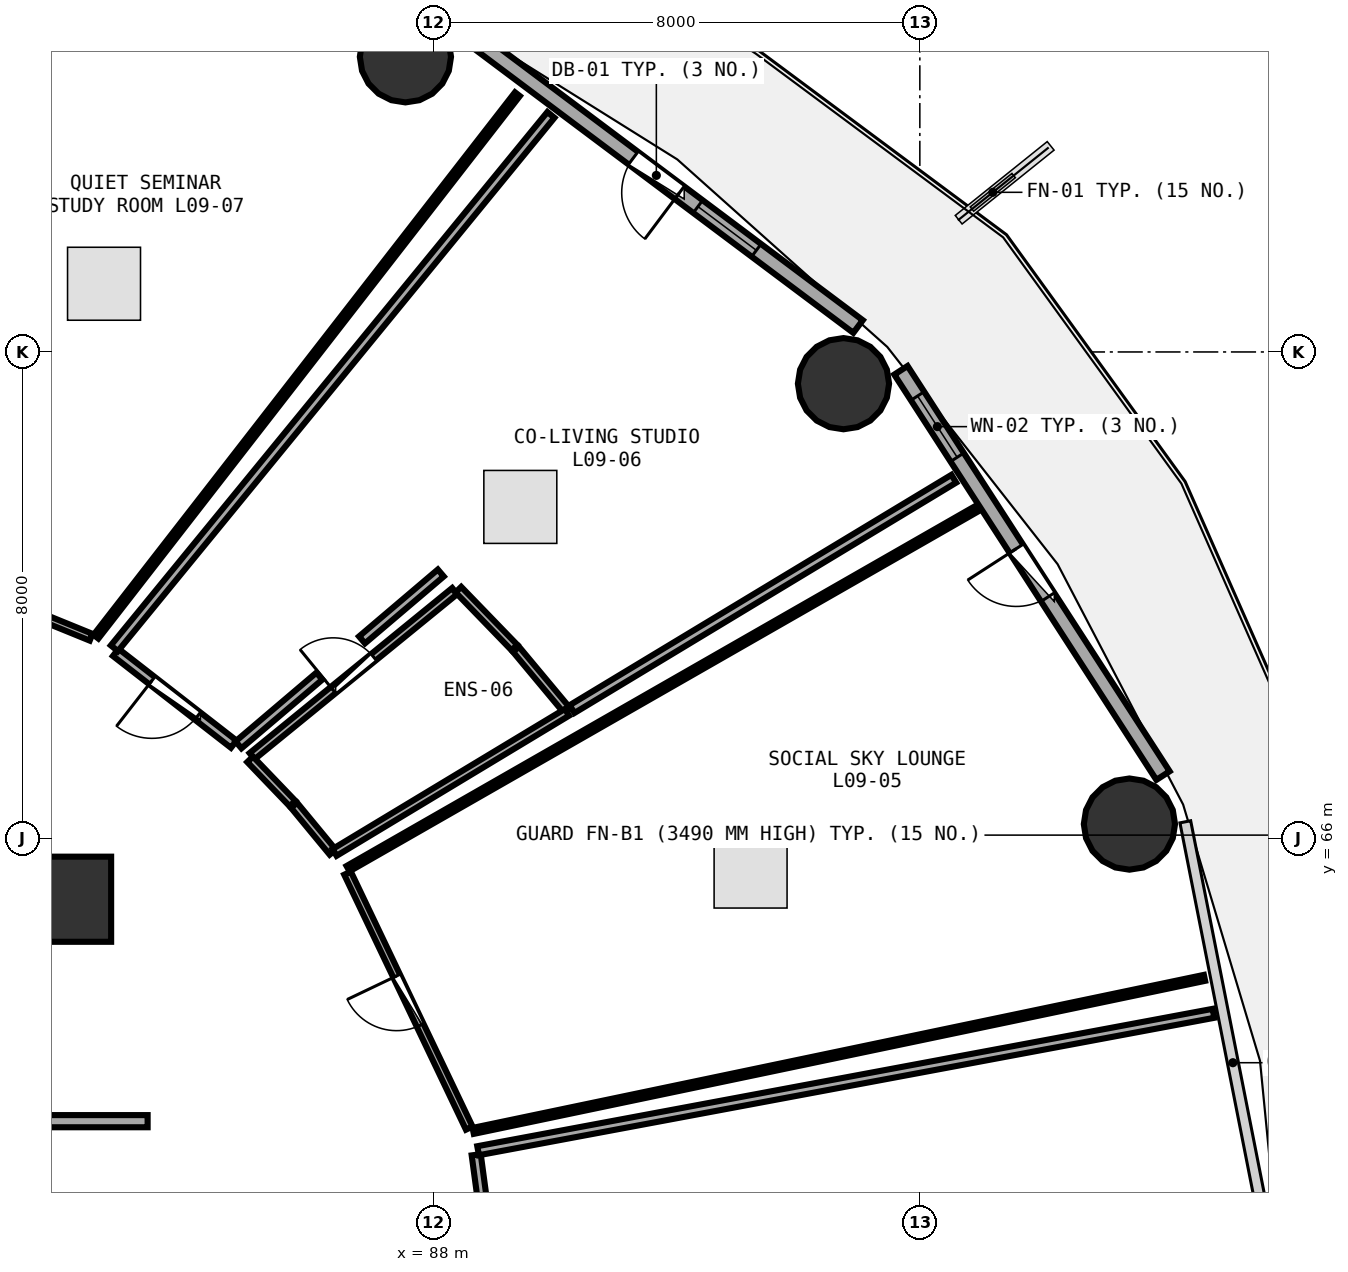
"""IFC4 building model, lengths in metres.
Left out: names, types, materials, properties, quantities, classifications, styles, units other than length and angle.
Written with IfcOpenShell. Run it as: python <this file> out.ifc"""

import sys

from ifc_helpers import new_model, si_unit, direction, frame, frame_2d, origin, origin_2d, place, context, subcontext, project, spatial, rectangle, circle, extrude, element, fill, save


model = new_model("IFC4")
c1 = context("Model", 3, precision=1e-05, world=origin(), true_north=direction((0.0, 1.0)))
c2 = subcontext(c1, "Body", "Model", "MODEL_VIEW")
j1 = project(units=[si_unit("LENGTHUNIT", "METRE"), si_unit("PLANEANGLEUNIT", "RADIAN")], contexts=[c1])
p1 = place(None, origin())
s1 = spatial("IfcSite", under=j1, at=p1, CompositionType="ELEMENT")
p2 = place(p1, origin())
s2 = spatial("IfcBuilding", under=s1, at=p2, CompositionType="ELEMENT")
p3 = place(p2, frame((0.0, 0.0, 37.5)))
s3 = spatial("IfcBuildingStorey", under=s2, at=p3, CompositionType="ELEMENT", Elevation=37.5)
p4 = place(p3, frame((82.0, 65.0, 0.0), z_axis=(0.0, 0.0, 1.0), x_axis=(1.0, 0.0, 0.0)))
e1 = element("IfcColumn", 1, at=p4, inside=s3, PredefinedType="PILASTER", context=c2, shape_type="SweptSolid", body=[
    extrude(rectangle(XDim=1.4, YDim=1.4, at=origin_2d()), origin(), (0.0, 0.0, 1.0), 3.75),
])
for number, where, z_axis, x_axis in (
    (2, (99.447, 66.236, 0.0), (0.0, 0.0, 1.0), (1.0, 0.0, 0.0)),
    (3, (94.744, 73.478, 0.0), (0.0, 0.0, 1.0), (1.0, 0.0, 0.0)),
    (4, (87.54, 78.854, 0.0), (0.0, 0.0, 1.0), (1.0, 0.0, 0.0)),
):
    element("IfcColumn", number, at=place(p3, frame(where, z_axis=z_axis, x_axis=x_axis)), inside=s3, PredefinedType="COLUMN", context=c2, shape_type="SweptSolid", body=[
        extrude(circle(Radius=0.75, at=origin_2d()), origin(), (0.0, 0.0, 1.0), 3.75),
    ])
p5 = place(p3, frame((99.999, 67.033, 0.0), z_axis=(0.0, 0.0, 1.0), x_axis=(-0.543005114258, 0.839729388488, 0.0)))
e5 = element("IfcWall", 5, at=p5, inside=s3, PredefinedType="SOLIDWALL", context=c2, shape_type="SweptSolid", body=[
    extrude(rectangle(XDim=7.938, YDim=0.26, at=frame_2d((3.969, 0.0))), origin(), (0.0, 0.0, 1.0), 3.475),
])
p6 = place(p5, frame((3.494, 0.0, 0.0)))
e6 = element("IfcOpeningElement", 6, at=p6, cuts=e5, PredefinedType="OPENING", context=c2, shape_type="SweptSolid", body=[
    extrude(rectangle(XDim=0.95, YDim=2.1, at=frame_2d((0.475, 1.05))), frame((0.0, 0.14, 0.0), z_axis=(0.0, -1.0, 0.0), x_axis=(1.0, 0.0, 0.0)), (0.0, 0.0, 1.0), 0.28),
])
p7 = place(p5, frame((6.234, 0.0, 0.85)))
e7 = element("IfcOpeningElement", 7, at=p7, cuts=e5, PredefinedType="OPENING", context=c2, shape_type="SweptSolid", body=[
    extrude(rectangle(XDim=1.2, YDim=1.45, at=frame_2d((0.6, 0.725))), frame((0.0, 0.14, 0.0), z_axis=(0.0, -1.0, 0.0), x_axis=(1.0, 0.0, 0.0)), (0.0, 0.0, 1.0), 0.28),
])
p8 = place(p3, frame((94.984, 74.418, 0.0), z_axis=(0.0, 0.0, 1.0), x_axis=(-0.80030733173, 0.599590005569, 0.0)))
e8 = element("IfcWall", 8, at=p8, inside=s3, PredefinedType="SOLIDWALL", context=c2, shape_type="SweptSolid", body=[
    extrude(rectangle(XDim=8.291, YDim=0.26, at=frame_2d((4.145, 0.0))), origin(), (0.0, 0.0, 1.0), 3.475),
])
p9 = place(p8, frame((3.67, 0.0, 0.0)))
e9 = element("IfcOpeningElement", 9, at=p9, cuts=e8, PredefinedType="OPENING", context=c2, shape_type="SweptSolid", body=[
    extrude(rectangle(XDim=0.95, YDim=2.1, at=frame_2d((0.475, 1.05))), frame((0.0, 0.14, 0.0), z_axis=(0.0, -1.0, 0.0), x_axis=(1.0, 0.0, 0.0)), (0.0, 0.0, 1.0), 0.28),
])
p10 = place(p8, frame((2.09, 0.0, 0.85)))
e10 = element("IfcOpeningElement", 10, at=p10, cuts=e8, PredefinedType="OPENING", context=c2, shape_type="SweptSolid", body=[
    extrude(rectangle(XDim=1.2, YDim=1.45, at=frame_2d((0.6, 0.725))), frame((0.0, 0.14, 0.0), z_axis=(0.0, -1.0, 0.0), x_axis=(1.0, 0.0, 0.0)), (0.0, 0.0, 1.0), 0.28),
])
p11 = place(p3, frame((74.0, 64.6, 0.0), z_axis=(0.0, 0.0, 1.0), x_axis=(1.0, 0.0, 0.0)))
e11 = element("IfcWall", 11, at=p11, inside=s3, PredefinedType="SHEAR", context=c2, shape_type="SweptSolid", body=[
    extrude(rectangle(XDim=8.0, YDim=0.45, at=frame_2d((4.0, 0.0))), origin(), (0.0, 0.0, 1.0), 3.49),
])
p12 = place(p3, frame((79.3, 61.35, 0.0), z_axis=(0.0, 0.0, 1.0), x_axis=(1.0, 0.0, 0.0)))
e12 = element("IfcWall", 12, at=p12, inside=s3, PredefinedType="SOLIDWALL", context=c2, shape_type="SweptSolid", body=[
    extrude(rectangle(XDim=4.0, YDim=0.2, at=frame_2d((2.0, 0.0))), origin(), (0.0, 0.0, 1.0), 2.775),
])
p13 = place(p12, frame((0.45, 0.0, 0.0)))
e13 = element("IfcOpeningElement", 13, at=p13, cuts=e12, PredefinedType="OPENING", context=c2, shape_type="SweptSolid", body=[
    extrude(rectangle(XDim=1.2, YDim=2.15, at=frame_2d((0.6, 1.075))), frame((0.0, 0.11, 0.0), z_axis=(0.0, -1.0, 0.0), x_axis=(1.0, 0.0, 0.0)), (0.0, 0.0, 1.0), 0.22),
])
p14 = place(p3, frame((89.014, 58.502, 0.0), z_axis=(0.0, 0.0, 1.0), x_axis=(-0.133772399852, 0.991012081176, 0.0)))
e14 = element("IfcWall", 14, at=p14, inside=s3, PredefinedType="PARTITIONING", context=c2, shape_type="SweptSolid", body=[
    extrude(rectangle(XDim=2.316, YDim=0.15, at=frame_2d((1.158, 0.0))), origin(), (0.0, 0.0, 1.0), 3.48),
])
p15 = place(p14, frame((0.683, 0.0, 0.0)))
e15 = element("IfcOpeningElement", 15, at=p15, cuts=e14, PredefinedType="OPENING", context=c2, shape_type="SweptSolid", body=[
    extrude(rectangle(XDim=0.95, YDim=2.08, at=frame_2d((0.475, 1.04))), frame((0.0, 0.085, 0.0), z_axis=(0.0, -1.0, 0.0), x_axis=(1.0, 0.0, 0.0)), (0.0, 0.0, 1.0), 0.17),
])
p16 = place(p3, frame((88.589, 61.236, 0.0), z_axis=(0.0, 0.0, 1.0), x_axis=(-0.430743204219, 0.902474538155, 0.0)))
e16 = element("IfcWall", 16, at=p16, inside=s3, PredefinedType="PARTITIONING", context=c2, shape_type="SweptSolid", body=[
    extrude(rectangle(XDim=4.646, YDim=0.12, at=frame_2d((2.323, 0.0))), origin(), (0.0, 0.0, 1.0), 2.875),
])
p17 = place(p16, frame((1.873, 0.0, 0.0)))
e17 = element("IfcOpeningElement", 17, at=p17, cuts=e16, PredefinedType="OPENING", context=c2, shape_type="SweptSolid", body=[
    extrude(rectangle(XDim=0.9, YDim=2.08, at=frame_2d((0.45, 1.04))), frame((0.0, 0.07, 0.0), z_axis=(0.0, -1.0, 0.0), x_axis=(1.0, 0.0, 0.0)), (0.0, 0.0, 1.0), 0.14),
])
p18 = place(p3, frame((85.019, 67.353, 0.0), z_axis=(0.0, 0.0, 1.0), x_axis=(0.775195837983, 0.631720992823, 0.0)))
e18 = element("IfcWall", 18, at=p18, inside=s3, PredefinedType="PLUMBINGWALL", context=c2, shape_type="SweptSolid", body=[
    extrude(rectangle(XDim=4.298, YDim=0.13, at=frame_2d((2.149, 0.0))), origin(), (0.0, 0.0, 1.0), 3.235),
])
p19 = place(p18, frame((1.719, 0.0, 0.0)))
e19 = element("IfcOpeningElement", 19, at=p19, cuts=e18, PredefinedType="OPENING", context=c2, shape_type="SweptSolid", body=[
    extrude(rectangle(XDim=0.86, YDim=2.05, at=frame_2d((0.43, 1.025))), frame((0.0, 0.075, 0.0), z_axis=(0.0, -1.0, 0.0), x_axis=(1.0, 0.0, 0.0)), (0.0, 0.0, 1.0), 0.15),
])
p20 = place(p3, frame((84.717, 67.55, 0.0), z_axis=(0.0, 0.0, 1.0), x_axis=(-0.78945378775, 0.613810000739, 0.0)))
e20 = element("IfcWall", 20, at=p20, inside=s3, PredefinedType="PARTITIONING", context=c2, shape_type="SweptSolid", body=[
    extrude(rectangle(XDim=2.459, YDim=0.15, at=frame_2d((1.229, 0.0))), origin(), (0.0, 0.0, 1.0), 2.875),
])
p21 = place(p20, frame((0.754, 0.0, 0.0)))
e21 = element("IfcOpeningElement", 21, at=p21, cuts=e20, PredefinedType="OPENING", context=c2, shape_type="SweptSolid", body=[
    extrude(rectangle(XDim=0.95, YDim=2.08, at=frame_2d((0.475, 1.04))), frame((0.0, 0.085, 0.0), z_axis=(0.0, -1.0, 0.0), x_axis=(1.0, 0.0, 0.0)), (0.0, 0.0, 1.0), 0.17),
])
p22 = place(p3, frame((82.37, 69.309, 0.0), z_axis=(0.0, 0.0, 1.0), x_axis=(-0.925986810505, 0.377555859139, 0.0)))
e22 = element("IfcWall", 22, at=p22, inside=s3, PredefinedType="PARTITIONING", context=c2, shape_type="SweptSolid", body=[
    extrude(rectangle(XDim=4.971, YDim=0.12, at=frame_2d((2.485, 0.0))), origin(), (0.0, 0.0, 1.0), 2.875),
])
p23 = place(p22, frame((2.035, 0.0, 0.0)))
e23 = element("IfcOpeningElement", 23, at=p23, cuts=e22, PredefinedType="OPENING", context=c2, shape_type="SweptSolid", body=[
    extrude(rectangle(XDim=0.9, YDim=2.08, at=frame_2d((0.45, 1.04))), frame((0.0, 0.07, 0.0), z_axis=(0.0, -1.0, 0.0), x_axis=(1.0, 0.0, 0.0)), (0.0, 0.0, 1.0), 0.14),
])
p24 = place(p3, frame((88.735, 60.864, 0.0), z_axis=(0.0, 0.0, 1.0), x_axis=(0.982991936411, 0.183648721617, 0.0)))
e24 = element("IfcWall", 24, at=p24, inside=s3, PredefinedType="PARTITIONING", context=c2, shape_type="SweptSolid", body=[
    extrude(rectangle(XDim=12.303, YDim=0.15, at=frame_2d((6.152, 0.0))), origin(), (0.0, 0.0, 1.0), 2.875),
])
p25 = place(p3, frame((86.597, 65.503, 0.0), z_axis=(0.0, 0.0, 1.0), x_axis=(0.867860677455, 0.496807653451, 0.0)))
e25 = element("IfcWall", 25, at=p25, inside=s3, PredefinedType="PARTITIONING", context=c2, shape_type="SweptSolid", body=[
    extrude(rectangle(XDim=11.91, YDim=0.1, at=frame_2d((5.955, 0.0))), origin(), (0.0, 0.0, 1.0), 2.875),
])
p26 = place(p3, frame((100.682, 63.707, 0.0), z_axis=(0.0, 0.0, 1.0), x_axis=(-0.978803686819, -0.204800738937, 0.0)))
e26 = element("IfcWall", 26, at=p26, inside=s3, PredefinedType="PARTITIONING", context=c2, shape_type="SweptSolid", body=[
    extrude(rectangle(XDim=12.288, YDim=0.1, at=frame_2d((6.144, 0.0))), origin(), (0.0, 0.0, 1.0), 2.875),
])
p27 = place(p3, frame((86.344, 65.774, 0.0), z_axis=(0.0, 0.0, 1.0), x_axis=(-0.636401138893, 0.771358276299, 0.0)))
e27 = element("IfcWall", 27, at=p27, inside=s3, PredefinedType="PLUMBINGWALL", context=c2, shape_type="SweptSolid", body=[
    extrude(rectangle(XDim=0.999, YDim=0.13, at=frame_2d((0.499, 0.0))), origin(), (0.0, 0.0, 1.0), 3.48),
])
p28 = place(p3, frame((85.682, 66.574, 0.0), z_axis=(0.0, 0.0, 1.0), x_axis=(-0.692147793157, 0.721755798334, 0.0)))
e28 = element("IfcWall", 28, at=p28, inside=s3, PredefinedType="PLUMBINGWALL", context=c2, shape_type="SweptSolid", body=[
    extrude(rectangle(XDim=1.006, YDim=0.13, at=frame_2d((0.503, 0.0))), origin(), (0.0, 0.0, 1.0), 2.875),
])
p29 = place(p3, frame((88.411, 70.092, 0.0), z_axis=(0.0, 0.0, 1.0), x_axis=(0.695307837391, -0.718712050311, 0.0)))
e29 = element("IfcWall", 29, at=p29, inside=s3, PredefinedType="PLUMBINGWALL", context=c2, shape_type="SweptSolid", body=[
    extrude(rectangle(XDim=1.325, YDim=0.13, at=frame_2d((0.662, 0.0))), origin(), (0.0, 0.0, 1.0), 2.875),
])
p30 = place(p3, frame((89.359, 69.11, 0.0), z_axis=(0.0, 0.0, 1.0), x_axis=(0.640366952349, -0.7680691156, 0.0)))
e30 = element("IfcWall", 30, at=p30, inside=s3, PredefinedType="PLUMBINGWALL", context=c2, shape_type="SweptSolid", body=[
    extrude(rectangle(XDim=1.315, YDim=0.13, at=frame_2d((0.658, 0.0))), origin(), (0.0, 0.0, 1.0), 3.48),
])
p31 = place(p3, frame((90.197, 68.074, 0.0), z_axis=(0.0, 0.0, 1.0), x_axis=(-0.856439095373, -0.516248075945, 0.0)))
e31 = element("IfcWall", 31, at=p31, inside=s3, PredefinedType="PLUMBINGWALL", context=c2, shape_type="SweptSolid", body=[
    extrude(rectangle(XDim=4.464, YDim=0.13, at=frame_2d((2.232, 0.0))), origin(), (0.0, 0.0, 1.0), 3.235),
])
p32 = place(p3, frame((82.753, 69.127, 0.0), z_axis=(0.0, 0.0, 1.0), x_axis=(0.633350378952, 0.773865167508, 0.0)))
e32 = element("IfcWall", 32, at=p32, inside=s3, PredefinedType="PARTITIONING", context=c2, shape_type="SweptSolid", body=[
    extrude(rectangle(XDim=11.335, YDim=0.15, at=frame_2d((5.667, 0.0))), origin(), (0.0, 0.0, 1.0), 2.875),
])
p33 = place(p3, frame((96.559, 71.915, 0.0), z_axis=(0.0, 0.0, 1.0), x_axis=(-0.856200610964, -0.516643507444, 0.0)))
e33 = element("IfcWall", 33, at=p33, inside=s3, PredefinedType="PARTITIONING", context=c2, shape_type="SweptSolid", body=[
    extrude(rectangle(XDim=7.333, YDim=0.15, at=frame_2d((3.667, 0.0))), origin(), (0.0, 0.0, 1.0), 2.875),
])
p34 = place(p3, frame((88.122, 70.365, 0.0), z_axis=(0.0, 0.0, 1.0), x_axis=(-0.762159009155, -0.647389870761, 0.0)))
e34 = element("IfcWall", 34, at=p34, inside=s3, PredefinedType="PARTITIONING", context=c2, shape_type="SweptSolid", body=[
    extrude(rectangle(XDim=1.7, YDim=0.15, at=frame_2d((0.85, 0.0))), origin(), (0.0, 0.0, 1.0), 3.48),
])
p35 = place(p3, frame((86.125, 68.669, 0.0), z_axis=(0.0, 0.0, 1.0), x_axis=(-0.762122187233, -0.647433217967, 0.0)))
e35 = element("IfcWall", 35, at=p35, inside=s3, PredefinedType="PARTITIONING", context=c2, shape_type="SweptSolid", body=[
    extrude(rectangle(XDim=1.746, YDim=0.15, at=frame_2d((0.873, 0.0))), origin(), (0.0, 0.0, 1.0), 3.235),
])
p36 = place(p3, frame((89.382, 78.24, 0.0), z_axis=(0.0, 0.0, 1.0), x_axis=(-0.613494694267, -0.789698841398, 0.0)))
e36 = element("IfcWall", 36, at=p36, inside=s3, PredefinedType="PARTITIONING", context=c2, shape_type="SweptSolid", body=[
    extrude(rectangle(XDim=11.298, YDim=0.1, at=frame_2d((5.649, 0.0))), origin(), (0.0, 0.0, 1.0), 2.875),
])
p37 = place(p6, frame((0.95, 0.0, 0.0), z_axis=(0.0, 0.0, 1.0), x_axis=(-1.0, 0.0, 0.0)))
e37 = element("IfcDoor", 37, at=p37, inside=s3, OperationType="SINGLE_SWING_LEFT", PredefinedType="DOOR", context=c2, shape_type="SweptSolid", body=[
    extrude(rectangle(XDim=0.95, YDim=2.1, at=frame_2d((0.475, 1.05))), frame((0.0, 0.025, 0.0), z_axis=(0.0, -1.0, 0.0), x_axis=(1.0, 0.0, 0.0)), (0.0, 0.0, 1.0), 0.05),
])
fill(e6, e37)
p38 = place(p7, origin())
e38 = element("IfcWindow", 38, at=p38, inside=s3, PartitioningType="SINGLE_PANEL", PredefinedType="WINDOW", context=c2, shape_type="SweptSolid", body=[
    extrude(rectangle(XDim=1.2, YDim=1.45, at=frame_2d((0.6, 0.725))), frame((0.0, 0.03, 0.0), z_axis=(0.0, -1.0, 0.0), x_axis=(1.0, 0.0, 0.0)), (0.0, 0.0, 1.0), 0.06),
])
fill(e7, e38)
p39 = place(p9, frame((0.95, 0.0, 0.0), z_axis=(0.0, 0.0, 1.0), x_axis=(-1.0, 0.0, 0.0)))
e39 = element("IfcDoor", 39, at=p39, inside=s3, OperationType="SINGLE_SWING_RIGHT", PredefinedType="DOOR", context=c2, shape_type="SweptSolid", body=[
    extrude(rectangle(XDim=0.95, YDim=2.1, at=frame_2d((0.475, 1.05))), frame((0.0, 0.025, 0.0), z_axis=(0.0, -1.0, 0.0), x_axis=(1.0, 0.0, 0.0)), (0.0, 0.0, 1.0), 0.05),
])
fill(e9, e39)
p40 = place(p10, origin())
e40 = element("IfcWindow", 40, at=p40, inside=s3, PartitioningType="SINGLE_PANEL", PredefinedType="WINDOW", context=c2, shape_type="SweptSolid", body=[
    extrude(rectangle(XDim=1.2, YDim=1.45, at=frame_2d((0.6, 0.725))), frame((0.0, 0.03, 0.0), z_axis=(0.0, -1.0, 0.0), x_axis=(1.0, 0.0, 0.0)), (0.0, 0.0, 1.0), 0.06),
])
fill(e10, e40)
p41 = place(p17, origin())
e41 = element("IfcDoor", 41, at=p41, inside=s3, OperationType="SINGLE_SWING_RIGHT", PredefinedType="DOOR", context=c2, shape_type="SweptSolid", body=[
    extrude(rectangle(XDim=0.9, YDim=2.08, at=frame_2d((0.45, 1.04))), frame((0.0, 0.025, 0.0), z_axis=(0.0, -1.0, 0.0), x_axis=(1.0, 0.0, 0.0)), (0.0, 0.0, 1.0), 0.05),
])
fill(e17, e41)
p42 = place(p19, origin())
e42 = element("IfcDoor", 42, at=p42, inside=s3, OperationType="SINGLE_SWING_LEFT", PredefinedType="DOOR", context=c2, shape_type="SweptSolid", body=[
    extrude(rectangle(XDim=0.86, YDim=2.05, at=frame_2d((0.43, 1.025))), frame((0.0, 0.025, 0.0), z_axis=(0.0, -1.0, 0.0), x_axis=(1.0, 0.0, 0.0)), (0.0, 0.0, 1.0), 0.05),
])
fill(e19, e42)
p43 = place(p21, origin())
e43 = element("IfcDoor", 43, at=p43, inside=s3, OperationType="SINGLE_SWING_RIGHT", PredefinedType="DOOR", context=c2, shape_type="SweptSolid", body=[
    extrude(rectangle(XDim=0.95, YDim=2.08, at=frame_2d((0.475, 1.04))), frame((0.0, 0.025, 0.0), z_axis=(0.0, -1.0, 0.0), x_axis=(1.0, 0.0, 0.0)), (0.0, 0.0, 1.0), 0.05),
])
fill(e21, e43)
save(model, sys.argv[1])
